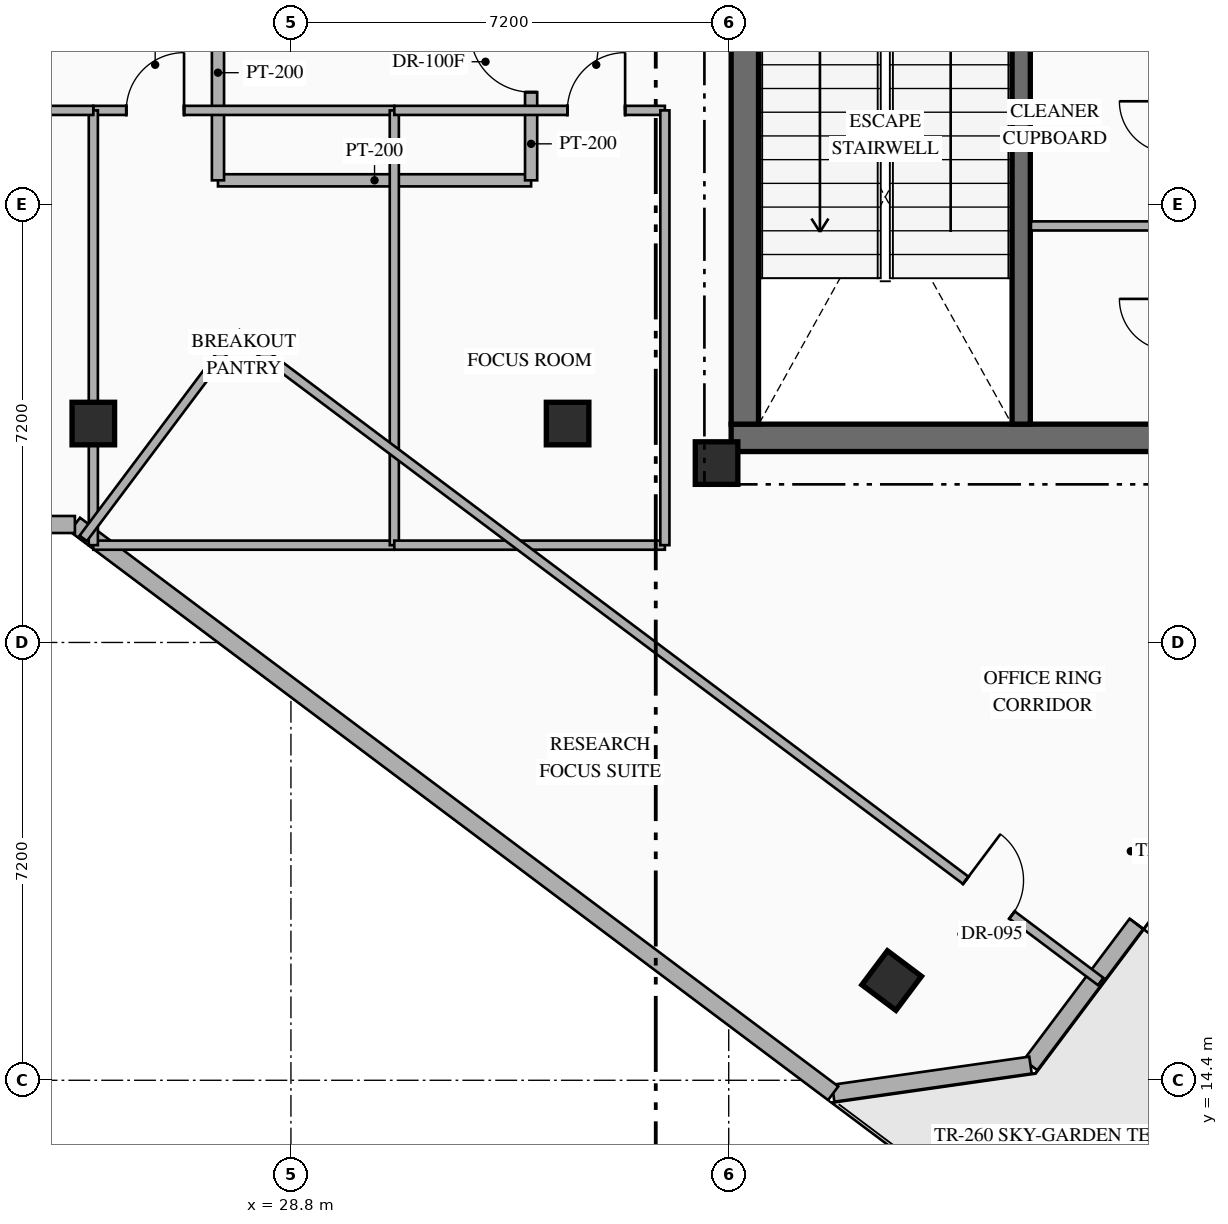
"""IFC4 building model, lengths in metres.
Left out: names, types, materials, properties, quantities, classifications, styles, units other than length and angle.
Written with IfcOpenShell. Run it as: python <this file> out.ifc"""

import sys

from ifc_helpers import new_model, si_unit, direction, frame, frame_2d, origin, origin_2d, place, context, subcontext, project, spatial, rectangle, hollow_rectangle, extrude, element, fill, save


model = new_model("IFC4")
c1 = context("Model", 3, precision=1e-05, world=origin(), true_north=direction((0.0, 1.0)))
c2 = subcontext(c1, "Body", "Model", "MODEL_VIEW")
j1 = project(units=[si_unit("LENGTHUNIT", "METRE"), si_unit("PLANEANGLEUNIT", "RADIAN")], contexts=[c1])
p1 = place(None, origin())
s1 = spatial("IfcSite", under=j1, at=p1, CompositionType="ELEMENT")
p2 = place(p1, origin())
s2 = spatial("IfcBuilding", under=s1, at=p2, CompositionType="ELEMENT")
p3 = place(p2, frame((0.0, 0.0, 234.75)))
s3 = spatial("IfcBuildingStorey", under=s2, at=p3, CompositionType="ELEMENT", Elevation=234.75)
p4 = place(p3, frame((36.04, 24.965, 0.0), z_axis=(0.0, 0.0, 1.0), x_axis=(1.0, 0.0, 0.0)))
e1 = element("IfcWall", 1, at=p4, inside=s3, PredefinedType="SHEAR", context=c2, shape_type="SweptSolid", body=[
    extrude(rectangle(XDim=7.46, YDim=0.45, at=frame_2d((3.73, 0.0))), origin(), (0.0, 0.0, 1.0), 4.8),
])
p5 = place(p3, frame((36.265, 25.19, 0.0), z_axis=(0.0, 0.0, 1.0), x_axis=(0.0, 1.0, 0.0)))
e2 = element("IfcWall", 2, at=p5, inside=s3, PredefinedType="SHEAR", context=c2, shape_type="SweptSolid", body=[
    extrude(rectangle(XDim=9.48, YDim=0.45, at=frame_2d((4.74, 0.0))), origin(), (0.0, 0.0, 1.0), 4.8),
])
p6 = place(p3, frame((40.81, 25.19, 0.0), z_axis=(0.0, 0.0, 1.0), x_axis=(0.0, 1.0, 0.0)))
e3 = element("IfcWall", 3, at=p6, inside=s3, PredefinedType="SHEAR", context=c2, shape_type="SweptSolid", body=[
    extrude(rectangle(XDim=9.48, YDim=0.3, at=frame_2d((4.74, 0.0))), origin(), (0.0, 0.0, 1.0), 4.8),
])
for number, where, z_axis, x_axis in (
    (4, (35.8, 24.55, 0.0), (0.0, 0.0, 1.0), (1.0, 0.0, 0.0)),
    (5, (25.55, 25.2, 0.0), (0.0, 0.0, 1.0), (1.0, 0.0, 0.0)),
    (6, (33.35, 25.2, 0.0), (0.0, 0.0, 1.0), (1.0, 0.0, 0.0)),
    (7, (38.68, 16.04, 0.0), (0.0, 0.0, 1.0), (0.8, -0.6, 0.0)),
):
    element("IfcColumn", number, at=place(p3, frame(where, z_axis=z_axis, x_axis=x_axis)), inside=s3, PredefinedType="COLUMN", context=c2, shape_type="SweptSolid", body=[
        extrude(hollow_rectangle(XDim=0.7, YDim=0.7, WallThickness=0.028, at=origin_2d()), origin(), (0.0, 0.0, 1.0), 4.8),
    ])
p7 = place(p3, frame((53.493, 31.358, 0.0), z_axis=(0.0, 0.0, 1.0), x_axis=(-0.599970072971, -0.800022444397, 0.0)))
e8 = element("IfcWall", 8, at=p7, inside=s3, PredefinedType="STANDARD", context=c2, shape_type="SweptSolid", body=[
    extrude(rectangle(XDim=20.885, YDim=0.28, at=frame_2d((10.442, 0.0))), origin(), (0.0, 0.0, 1.0), 4.55),
])
p8 = place(p7, frame((16.181, 0.0, 0.0)))
e9 = element("IfcOpeningElement", 9, at=p8, cuts=e8, PredefinedType="OPENING", context=c2, shape_type="SweptSolid", body=[
    extrude(rectangle(XDim=1.8, YDim=2.25, at=frame_2d((0.9, 1.125))), frame((0.0, 0.15, 0.0), z_axis=(0.0, -1.0, 0.0), x_axis=(1.0, 0.0, 0.0)), (0.0, 0.0, 1.0), 0.3),
])
p9 = place(p7, frame((1.456, 0.0, 0.75)))
e10 = element("IfcOpeningElement", 10, at=p9, cuts=e8, PredefinedType="OPENING", context=c2, shape_type="SweptSolid", body=[
    extrude(rectangle(XDim=2.1, YDim=2.2, at=frame_2d((1.05, 1.1))), frame((0.0, 0.15, 0.0), z_axis=(0.0, -1.0, 0.0), x_axis=(1.0, 0.0, 0.0)), (0.0, 0.0, 1.0), 0.3),
])
p10 = place(p3, frame((40.963, 14.65, 0.0), z_axis=(0.0, 0.0, 1.0), x_axis=(-0.989977778067, -0.141223223777, 0.0)))
e11 = element("IfcWall", 11, at=p10, inside=s3, PredefinedType="STANDARD", context=c2, shape_type="SweptSolid", body=[
    extrude(rectangle(XDim=3.278, YDim=0.28, at=frame_2d((1.639, 0.0))), origin(), (0.0, 0.0, 1.0), 4.55),
])
p11 = place(p3, frame((37.718, 14.187, 0.0), z_axis=(0.0, 0.0, 1.0), x_axis=(-0.800005638109, 0.599992482448, 0.0)))
e12 = element("IfcWall", 12, at=p11, inside=s3, PredefinedType="STANDARD", context=c2, shape_type="SweptSolid", body=[
    extrude(rectangle(XDim=15.589, YDim=0.28, at=frame_2d((7.794, 0.0))), origin(), (0.0, 0.0, 1.0), 4.55),
])
p12 = place(p3, frame((25.247, 23.54, 0.0), z_axis=(0.0, 0.0, 1.0), x_axis=(-1.0, 0.0, 0.0)))
e13 = element("IfcWall", 13, at=p12, inside=s3, PredefinedType="STANDARD", context=c2, shape_type="SweptSolid", body=[
    extrude(rectangle(XDim=4.789, YDim=0.28, at=frame_2d((2.395, 0.0))), origin(), (0.0, 0.0, 1.0), 4.55),
])
p13 = place(p3, frame((40.97, 28.45, 0.0), z_axis=(0.0, 0.0, 1.0), x_axis=(1.0, 0.0, 0.0)))
e14 = element("IfcWall", 14, at=p13, inside=s3, PredefinedType="PARTITIONING", context=c2, shape_type="SweptSolid", body=[
    extrude(rectangle(XDim=2.08, YDim=0.15, at=frame_2d((1.04, 0.0))), origin(), (0.0, 0.0, 1.0), 4.55),
])
p14 = place(p3, frame((27.6, 29.2, 0.0), z_axis=(0.0, 0.0, 1.0), x_axis=(1.0, 0.0, 0.0)))
e15 = element("IfcWall", 15, at=p14, inside=s3, PredefinedType="STANDARD", context=c2, shape_type="SweptSolid", body=[
    extrude(rectangle(XDim=5.15, YDim=0.2, at=frame_2d((2.575, 0.0))), origin(), (0.0, 0.0, 1.0), 4.55),
])
p15 = place(p3, frame((27.6, 29.2, 0.0), z_axis=(0.0, 0.0, 1.0), x_axis=(0.0, 1.0, 0.0)))
e16 = element("IfcWall", 16, at=p15, inside=s3, PredefinedType="STANDARD", context=c2, shape_type="SweptSolid", body=[
    extrude(rectangle(XDim=3.54, YDim=0.2, at=frame_2d((1.77, 0.0))), origin(), (0.0, 0.0, 1.0), 4.55),
])
p16 = place(p3, frame((32.75, 29.2, 0.0), z_axis=(0.0, 0.0, 1.0), x_axis=(0.0, 1.0, 0.0)))
e17 = element("IfcWall", 17, at=p16, inside=s3, PredefinedType="STANDARD", context=c2, shape_type="SweptSolid", body=[
    extrude(rectangle(XDim=3.54, YDim=0.2, at=frame_2d((1.77, 0.0))), origin(), (0.0, 0.0, 1.0), 4.55),
])
p17 = place(p16, frame((1.45, 0.0, 0.0)))
e18 = element("IfcOpeningElement", 18, at=p17, cuts=e17, PredefinedType="OPENING", context=c2, shape_type="SweptSolid", body=[
    extrude(rectangle(XDim=1.0, YDim=2.2, at=frame_2d((0.5, 1.1))), frame((0.0, 0.11, 0.0), z_axis=(0.0, -1.0, 0.0), x_axis=(1.0, 0.0, 0.0)), (0.0, 0.0, 1.0), 0.22),
])
p18 = place(p3, frame((25.55, 23.2, 0.0), z_axis=(0.0, 0.0, 1.0), x_axis=(1.0, 0.0, 0.0)))
e19 = element("IfcWall", 19, at=p18, inside=s3, PredefinedType="PARTITIONING", context=c2, shape_type="SweptSolid", body=[
    extrude(rectangle(XDim=4.95, YDim=0.15, at=frame_2d((2.475, 0.0))), origin(), (0.0, 0.0, 1.0), 4.55),
])
p19 = place(p3, frame((25.55, 30.35, 0.0), z_axis=(0.0, 0.0, 1.0), x_axis=(1.0, 0.0, 0.0)))
e20 = element("IfcWall", 20, at=p19, inside=s3, PredefinedType="PARTITIONING", context=c2, shape_type="SweptSolid", body=[
    extrude(rectangle(XDim=4.95, YDim=0.15, at=frame_2d((2.475, 0.0))), origin(), (0.0, 0.0, 1.0), 4.55),
])
p20 = place(p19, frame((0.542, 0.0, 0.0)))
e21 = element("IfcOpeningElement", 21, at=p20, cuts=e20, PredefinedType="OPENING", context=c2, shape_type="SweptSolid", body=[
    extrude(rectangle(XDim=0.95, YDim=2.15, at=frame_2d((0.475, 1.075))), frame((0.0, 0.085, 0.0), z_axis=(0.0, -1.0, 0.0), x_axis=(1.0, 0.0, 0.0)), (0.0, 0.0, 1.0), 0.17),
])
p21 = place(p3, frame((25.55, 23.2, 0.0), z_axis=(0.0, 0.0, 1.0), x_axis=(0.0, 1.0, 0.0)))
e22 = element("IfcWall", 22, at=p21, inside=s3, PredefinedType="PARTITIONING", context=c2, shape_type="SweptSolid", body=[
    extrude(rectangle(XDim=7.15, YDim=0.15, at=frame_2d((3.575, 0.0))), origin(), (0.0, 0.0, 1.0), 3.745),
])
p22 = place(p3, frame((30.5, 23.2, 0.0), z_axis=(0.0, 0.0, 1.0), x_axis=(0.0, 1.0, 0.0)))
e23 = element("IfcWall", 23, at=p22, inside=s3, PredefinedType="PARTITIONING", context=c2, shape_type="SweptSolid", body=[
    extrude(rectangle(XDim=7.15, YDim=0.15, at=frame_2d((3.575, 0.0))), origin(), (0.0, 0.0, 1.0), 4.55),
])
p23 = place(p3, frame((30.5, 23.2, 0.0), z_axis=(0.0, 0.0, 1.0), x_axis=(1.0, 0.0, 0.0)))
e24 = element("IfcWall", 24, at=p23, inside=s3, PredefinedType="PARTITIONING", context=c2, shape_type="SweptSolid", body=[
    extrude(rectangle(XDim=4.45, YDim=0.15, at=frame_2d((2.225, 0.0))), origin(), (0.0, 0.0, 1.0), 4.55),
])
p24 = place(p3, frame((30.5, 30.35, 0.0), z_axis=(0.0, 0.0, 1.0), x_axis=(1.0, 0.0, 0.0)))
e25 = element("IfcWall", 25, at=p24, inside=s3, PredefinedType="PARTITIONING", context=c2, shape_type="SweptSolid", body=[
    extrude(rectangle(XDim=4.45, YDim=0.15, at=frame_2d((2.225, 0.0))), origin(), (0.0, 0.0, 1.0), 4.55),
])
p25 = place(p24, frame((2.846, 0.0, 0.0)))
e26 = element("IfcOpeningElement", 26, at=p25, cuts=e25, PredefinedType="OPENING", context=c2, shape_type="SweptSolid", body=[
    extrude(rectangle(XDim=0.95, YDim=2.15, at=frame_2d((0.475, 1.075))), frame((0.0, 0.085, 0.0), z_axis=(0.0, -1.0, 0.0), x_axis=(1.0, 0.0, 0.0)), (0.0, 0.0, 1.0), 0.17),
])
p26 = place(p3, frame((34.95, 23.2, 0.0), z_axis=(0.0, 0.0, 1.0), x_axis=(0.0, 1.0, 0.0)))
e27 = element("IfcWall", 27, at=p26, inside=s3, PredefinedType="PARTITIONING", context=c2, shape_type="SweptSolid", body=[
    extrude(rectangle(XDim=7.15, YDim=0.15, at=frame_2d((3.575, 0.0))), origin(), (0.0, 0.0, 1.0), 4.55),
])
p27 = place(p3, frame((22.25, 30.35, 0.0), z_axis=(0.0, 0.0, 1.0), x_axis=(1.0, 0.0, 0.0)))
e28 = element("IfcWall", 28, at=p27, inside=s3, PredefinedType="PARTITIONING", context=c2, shape_type="SweptSolid", body=[
    extrude(rectangle(XDim=3.3, YDim=0.15, at=frame_2d((1.65, 0.0))), origin(), (0.0, 0.0, 1.0), 4.55),
])
p28 = place(p27, frame((1.175, 0.0, 0.0)))
e29 = element("IfcOpeningElement", 29, at=p28, cuts=e28, PredefinedType="OPENING", context=c2, shape_type="SweptSolid", body=[
    extrude(rectangle(XDim=0.95, YDim=2.15, at=frame_2d((0.475, 1.075))), frame((0.0, 0.085, 0.0), z_axis=(0.0, -1.0, 0.0), x_axis=(1.0, 0.0, 0.0)), (0.0, 0.0, 1.0), 0.17),
])
p29 = place(p3, frame((27.91, 26.68, 0.0), z_axis=(0.0, 0.0, 1.0), x_axis=(0.8, -0.6, 0.0)))
e30 = element("IfcWall", 30, at=p29, inside=s3, PredefinedType="PARTITIONING", context=c2, shape_type="SweptSolid", body=[
    extrude(rectangle(XDim=17.76, YDim=0.15, at=frame_2d((8.88, 0.0))), origin(), (0.0, 0.0, 1.0), 4.55),
])
p30 = place(p29, frame((14.986, 0.0, 0.0)))
e31 = element("IfcOpeningElement", 31, at=p30, cuts=e30, PredefinedType="OPENING", context=c2, shape_type="SweptSolid", body=[
    extrude(rectangle(XDim=0.95, YDim=2.15, at=frame_2d((0.475, 1.075))), frame((0.0, 0.085, 0.0), z_axis=(0.0, -1.0, 0.0), x_axis=(1.0, 0.0, 0.0)), (0.0, 0.0, 1.0), 0.17),
])
p31 = place(p3, frame((25.384, 23.312, 0.0), z_axis=(0.0, 0.0, 1.0), x_axis=(0.599990721155, 0.80000695905, 0.0)))
e32 = element("IfcWall", 32, at=p31, inside=s3, PredefinedType="PARTITIONING", context=c2, shape_type="SweptSolid", body=[
    extrude(rectangle(XDim=4.21, YDim=0.15, at=frame_2d((2.105, 0.0))), origin(), (0.0, 0.0, 1.0), 4.55),
])
p32 = place(p8, origin())
e33 = element("IfcDoor", 33, at=p32, inside=s3, OperationType="DOUBLE_DOOR_SINGLE_SWING", PredefinedType="DOOR", context=c2, shape_type="SweptSolid", body=[
    extrude(rectangle(XDim=1.8, YDim=2.25, at=frame_2d((0.9, 1.125))), frame((0.0, 0.025, 0.0), z_axis=(0.0, -1.0, 0.0), x_axis=(1.0, 0.0, 0.0)), (0.0, 0.0, 1.0), 0.05),
])
fill(e9, e33)
p33 = place(p17, origin())
e34 = element("IfcDoor", 34, at=p33, inside=s3, OperationType="SINGLE_SWING_RIGHT", PredefinedType="DOOR", context=c2, shape_type="SweptSolid", body=[
    extrude(rectangle(XDim=1.0, YDim=2.2, at=frame_2d((0.5, 1.1))), frame((0.0, 0.025, 0.0), z_axis=(0.0, -1.0, 0.0), x_axis=(1.0, 0.0, 0.0)), (0.0, 0.0, 1.0), 0.05),
])
fill(e18, e34)
p34 = place(p20, origin())
e35 = element("IfcDoor", 35, at=p34, inside=s3, OperationType="SINGLE_SWING_RIGHT", PredefinedType="DOOR", context=c2, shape_type="SweptSolid", body=[
    extrude(rectangle(XDim=0.95, YDim=2.15, at=frame_2d((0.475, 1.075))), frame((0.0, 0.025, 0.0), z_axis=(0.0, -1.0, 0.0), x_axis=(1.0, 0.0, 0.0)), (0.0, 0.0, 1.0), 0.05),
])
fill(e21, e35)
p35 = place(p25, origin())
e36 = element("IfcDoor", 36, at=p35, inside=s3, OperationType="SINGLE_SWING_RIGHT", PredefinedType="DOOR", context=c2, shape_type="SweptSolid", body=[
    extrude(rectangle(XDim=0.95, YDim=2.15, at=frame_2d((0.475, 1.075))), frame((0.0, 0.025, 0.0), z_axis=(0.0, -1.0, 0.0), x_axis=(1.0, 0.0, 0.0)), (0.0, 0.0, 1.0), 0.05),
])
fill(e26, e36)
p36 = place(p30, origin())
e37 = element("IfcDoor", 37, at=p36, inside=s3, OperationType="SINGLE_SWING_LEFT", PredefinedType="DOOR", context=c2, shape_type="SweptSolid", body=[
    extrude(rectangle(XDim=0.95, YDim=2.15, at=frame_2d((0.475, 1.075))), frame((0.0, 0.025, 0.0), z_axis=(0.0, -1.0, 0.0), x_axis=(1.0, 0.0, 0.0)), (0.0, 0.0, 1.0), 0.05),
])
fill(e31, e37)
save(model, sys.argv[1])
